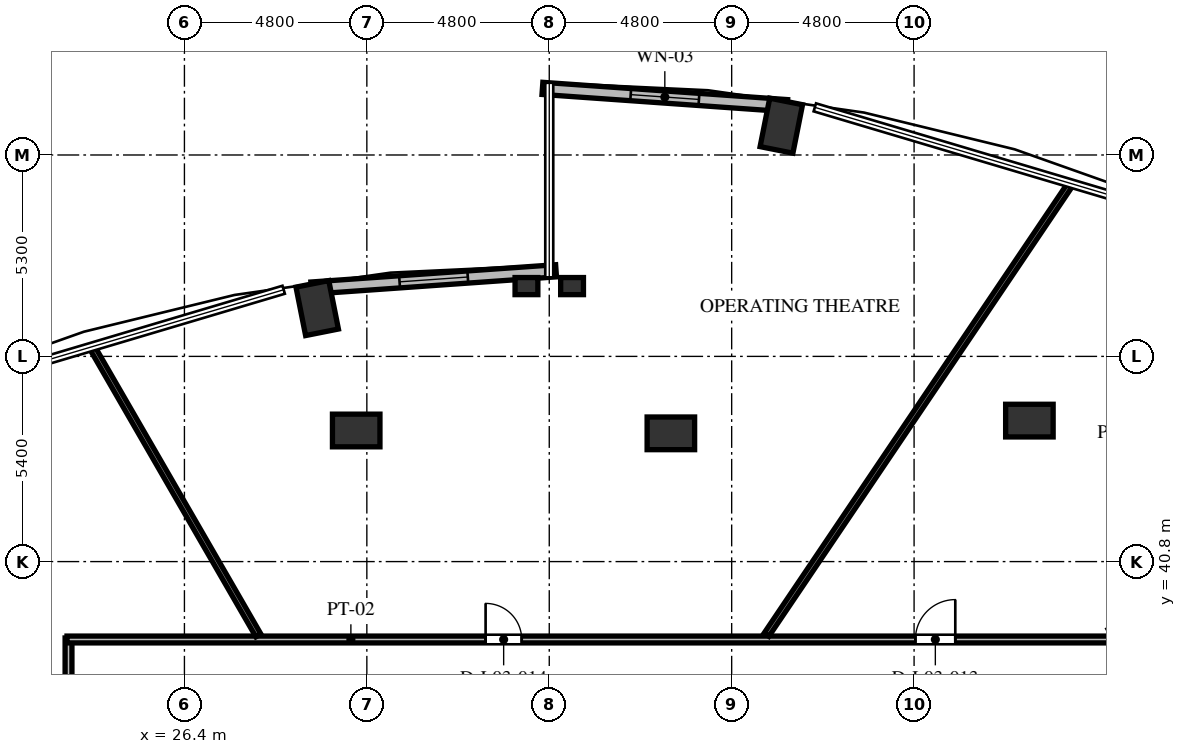
"""IFC4 building model, lengths in metres.
Left out: names, types, materials, properties, quantities, classifications, styles, units other than length and angle.
Written with IfcOpenShell. Run it as: python <this file> out.ifc"""

import sys

from ifc_helpers import new_model, si_unit, direction, frame, frame_2d, origin, origin_2d, place, context, subcontext, project, spatial, rectangle, extrude, element, fill, save


model = new_model("IFC4")
c1 = context("Model", 3, precision=1e-05, world=origin(), true_north=direction((0.0, 1.0)))
c2 = subcontext(c1, "Body", "Model", "MODEL_VIEW")
j1 = project(units=[si_unit("LENGTHUNIT", "METRE"), si_unit("PLANEANGLEUNIT", "RADIAN")], contexts=[c1])
p1 = place(None, origin())
s1 = spatial("IfcSite", under=j1, at=p1, CompositionType="ELEMENT")
p2 = place(p1, origin())
s2 = spatial("IfcBuilding", under=s1, at=p2, CompositionType="ELEMENT")
p3 = place(p2, frame((0.0, 0.0, 15.6)))
s3 = spatial("IfcBuildingStorey", under=s2, at=p3, CompositionType="ELEMENT", Elevation=15.6)
for number, where, z_axis, x_axis in (
    (1, (42.106, 52.271, 0.0), (0.0, 0.0, 1.0), (0.195, 0.981, 0.0)),
    (2, (29.894, 47.471, 0.0), (0.0, 0.0, 1.0), (-0.195, 0.981, 0.0)),
):
    element("IfcColumn", number, at=place(p3, frame(where, z_axis=z_axis, x_axis=x_axis)), inside=s3, PredefinedType="COLUMN", context=c2, shape_type="SweptSolid", body=[
        extrude(rectangle(XDim=1.3, YDim=0.88, at=origin_2d()), origin(), (0.0, 0.0, 1.0), 4.8),
    ])
for number, where, z_axis, x_axis in (
    (3, (48.634, 44.51, 0.0), (0.0, 0.0, 1.0), (1.0, 0.0, 0.0)),
    (4, (39.2, 44.175, 0.0), (0.0, 0.0, 1.0), (1.0, 0.0, 0.0)),
    (5, (30.92, 44.25, 0.0), (0.0, 0.0, 1.0), (1.0, 0.0, 0.0)),
):
    element("IfcColumn", number, at=place(p3, frame(where, z_axis=z_axis, x_axis=x_axis)), inside=s3, PredefinedType="COLUMN", context=c2, shape_type="SweptSolid", body=[
        extrude(rectangle(XDim=1.25, YDim=0.86, at=origin_2d()), origin(), (0.0, 0.0, 1.0), 4.8),
    ])
for number, where, z_axis, x_axis in (
    (6, (35.4, 48.05, 0.0), (0.0, 0.0, 1.0), (1.0, 0.0, 0.0)),
    (7, (36.6, 48.05, 0.0), (0.0, 0.0, 1.0), (1.0, 0.0, 0.0)),
):
    element("IfcColumn", number, at=place(p3, frame(where, z_axis=z_axis, x_axis=x_axis)), inside=s3, PredefinedType="PILASTER", context=c2, shape_type="SweptSolid", body=[
        extrude(rectangle(XDim=0.6, YDim=0.45, at=origin_2d()), origin(), (0.0, 0.0, 1.0), 4.8),
    ])
p4 = place(p3, frame((42.262, 52.798, 0.0), z_axis=(0.0, 0.0, 1.0), x_axis=(-0.99751367159, 0.070473221795, 0.0)))
e8 = element("IfcWall", 8, at=p4, inside=s3, PredefinedType="SOLIDWALL", context=c2, shape_type="SweptSolid", body=[
    extrude(rectangle(XDim=6.458, YDim=0.32, at=frame_2d((3.229, 0.0))), origin(), (0.0, 0.0, 1.0), 4.52),
])
p5 = place(p4, frame((2.329, 0.0, 0.85)))
e9 = element("IfcOpeningElement", 9, at=p5, cuts=e8, PredefinedType="OPENING", context=c2, shape_type="SweptSolid", body=[
    extrude(rectangle(XDim=1.8, YDim=2.4, at=frame_2d((0.9, 1.2))), frame((0.0, 0.17, 0.0), z_axis=(0.0, -1.0, 0.0), x_axis=(1.0, 0.0, 0.0)), (0.0, 0.0, 1.0), 0.34),
])
p6 = place(p3, frame((36.179, 48.453, 0.0), z_axis=(0.0, 0.0, 1.0), x_axis=(-0.997513108184, -0.070481196075, 0.0)))
e10 = element("IfcWall", 10, at=p6, inside=s3, PredefinedType="SOLIDWALL", context=c2, shape_type="SweptSolid", body=[
    extrude(rectangle(XDim=6.457, YDim=0.32, at=frame_2d((3.229, 0.0))), origin(), (0.0, 0.0, 1.0), 4.52),
])
p7 = place(p6, frame((2.328, 0.0, 0.85)))
e11 = element("IfcOpeningElement", 11, at=p7, cuts=e10, PredefinedType="OPENING", context=c2, shape_type="SweptSolid", body=[
    extrude(rectangle(XDim=1.8, YDim=2.4, at=frame_2d((0.9, 1.2))), frame((0.0, 0.17, 0.0), z_axis=(0.0, -1.0, 0.0), x_axis=(1.0, 0.0, 0.0)), (0.0, 0.0, 1.0), 0.34),
])
p8 = place(p3, frame((23.35, 29.36, 0.0), z_axis=(0.0, 0.0, 1.0), x_axis=(0.0, 1.0, 0.0)))
e12 = element("IfcWall", 12, at=p8, inside=s3, PredefinedType="PARTITIONING", context=c2, shape_type="SweptSolid", body=[
    extrude(rectangle(XDim=9.43, YDim=0.18, at=frame_2d((4.715, 0.0))), origin(), (0.0, 0.0, 1.0), 4.52),
])
p9 = place(p8, frame((4.298, 0.0, 0.0)))
e13 = element("IfcOpeningElement", 13, at=p9, cuts=e12, PredefinedType="OPENING", context=c2, shape_type="SweptSolid", body=[
    extrude(rectangle(XDim=1.4, YDim=2.2, at=frame_2d((0.7, 1.1))), frame((0.0, 0.1, 0.0), z_axis=(0.0, -1.0, 0.0), x_axis=(1.0, 0.0, 0.0)), (0.0, 0.0, 1.0), 0.2),
])
p10 = place(p3, frame((23.31, 38.75, 0.0), z_axis=(0.0, 0.0, 1.0), x_axis=(1.0, 0.0, 0.0)))
e14 = element("IfcWall", 14, at=p10, inside=s3, PredefinedType="PARTITIONING", context=c2, shape_type="SweptSolid", body=[
    extrude(rectangle(XDim=29.88, YDim=0.18, at=frame_2d((14.94, 0.0))), origin(), (0.0, 0.0, 1.0), 4.52),
])
p11 = place(p10, frame((22.324, 0.0, 0.0)))
e15 = element("IfcOpeningElement", 15, at=p11, cuts=e14, PredefinedType="OPENING", context=c2, shape_type="SweptSolid", body=[
    extrude(rectangle(XDim=1.05, YDim=2.15, at=frame_2d((0.525, 1.075))), frame((0.0, 0.1, 0.0), z_axis=(0.0, -1.0, 0.0), x_axis=(1.0, 0.0, 0.0)), (0.0, 0.0, 1.0), 0.2),
])
p12 = place(p10, frame((11.015, 0.0, 0.0)))
e16 = element("IfcOpeningElement", 16, at=p12, cuts=e14, PredefinedType="OPENING", context=c2, shape_type="SweptSolid", body=[
    extrude(rectangle(XDim=0.95, YDim=2.1, at=frame_2d((0.475, 1.05))), frame((0.0, 0.1, 0.0), z_axis=(0.0, -1.0, 0.0), x_axis=(1.0, 0.0, 0.0)), (0.0, 0.0, 1.0), 0.2),
])
p13 = place(p3, frame((41.717, 38.875, 0.0), z_axis=(0.0, 0.0, 1.0), x_axis=(0.559191016445, 0.829038845367, 0.0)))
e17 = element("IfcWall", 17, at=p13, inside=s3, PredefinedType="PARTITIONING", context=c2, shape_type="SweptSolid", body=[
    extrude(rectangle(XDim=14.314, YDim=0.15, at=frame_2d((7.157, 0.0))), origin(), (0.0, 0.0, 1.0), 4.52),
])
p14 = place(p3, frame((28.346, 38.857, 0.0), z_axis=(0.0, 0.0, 1.0), x_axis=(-0.500008731563, 0.866020362555, 0.0)))
e18 = element("IfcWall", 18, at=p14, inside=s3, PredefinedType="PARTITIONING", context=c2, shape_type="SweptSolid", body=[
    extrude(rectangle(XDim=8.76, YDim=0.15, at=frame_2d((4.38, 0.0))), origin(), (0.0, 0.0, 1.0), 4.52),
])
p15 = place(p5, origin())
e19 = element("IfcWindow", 19, at=p15, inside=s3, PartitioningType="SINGLE_PANEL", PredefinedType="WINDOW", context=c2, shape_type="SweptSolid", body=[
    extrude(rectangle(XDim=1.8, YDim=2.4, at=frame_2d((0.9, 1.2))), frame((0.0, 0.03, 0.0), z_axis=(0.0, -1.0, 0.0), x_axis=(1.0, 0.0, 0.0)), (0.0, 0.0, 1.0), 0.06),
])
fill(e9, e19)
p16 = place(p7, origin())
e20 = element("IfcWindow", 20, at=p16, inside=s3, PartitioningType="SINGLE_PANEL", PredefinedType="WINDOW", context=c2, shape_type="SweptSolid", body=[
    extrude(rectangle(XDim=1.8, YDim=2.4, at=frame_2d((0.9, 1.2))), frame((0.0, 0.03, 0.0), z_axis=(0.0, -1.0, 0.0), x_axis=(1.0, 0.0, 0.0)), (0.0, 0.0, 1.0), 0.06),
])
fill(e11, e20)
p17 = place(p11, origin())
e21 = element("IfcDoor", 21, at=p17, inside=s3, OperationType="SINGLE_SWING_RIGHT", PredefinedType="DOOR", context=c2, shape_type="SweptSolid", body=[
    extrude(rectangle(XDim=1.05, YDim=2.15, at=frame_2d((0.525, 1.075))), frame((0.0, 0.025, 0.0), z_axis=(0.0, -1.0, 0.0), x_axis=(1.0, 0.0, 0.0)), (0.0, 0.0, 1.0), 0.05),
])
fill(e15, e21)
p18 = place(p12, origin())
e22 = element("IfcDoor", 22, at=p18, inside=s3, OperationType="SINGLE_SWING_LEFT", PredefinedType="DOOR", context=c2, shape_type="SweptSolid", body=[
    extrude(rectangle(XDim=0.95, YDim=2.1, at=frame_2d((0.475, 1.05))), frame((0.0, 0.025, 0.0), z_axis=(0.0, -1.0, 0.0), x_axis=(1.0, 0.0, 0.0)), (0.0, 0.0, 1.0), 0.05),
])
fill(e16, e22)
save(model, sys.argv[1])
